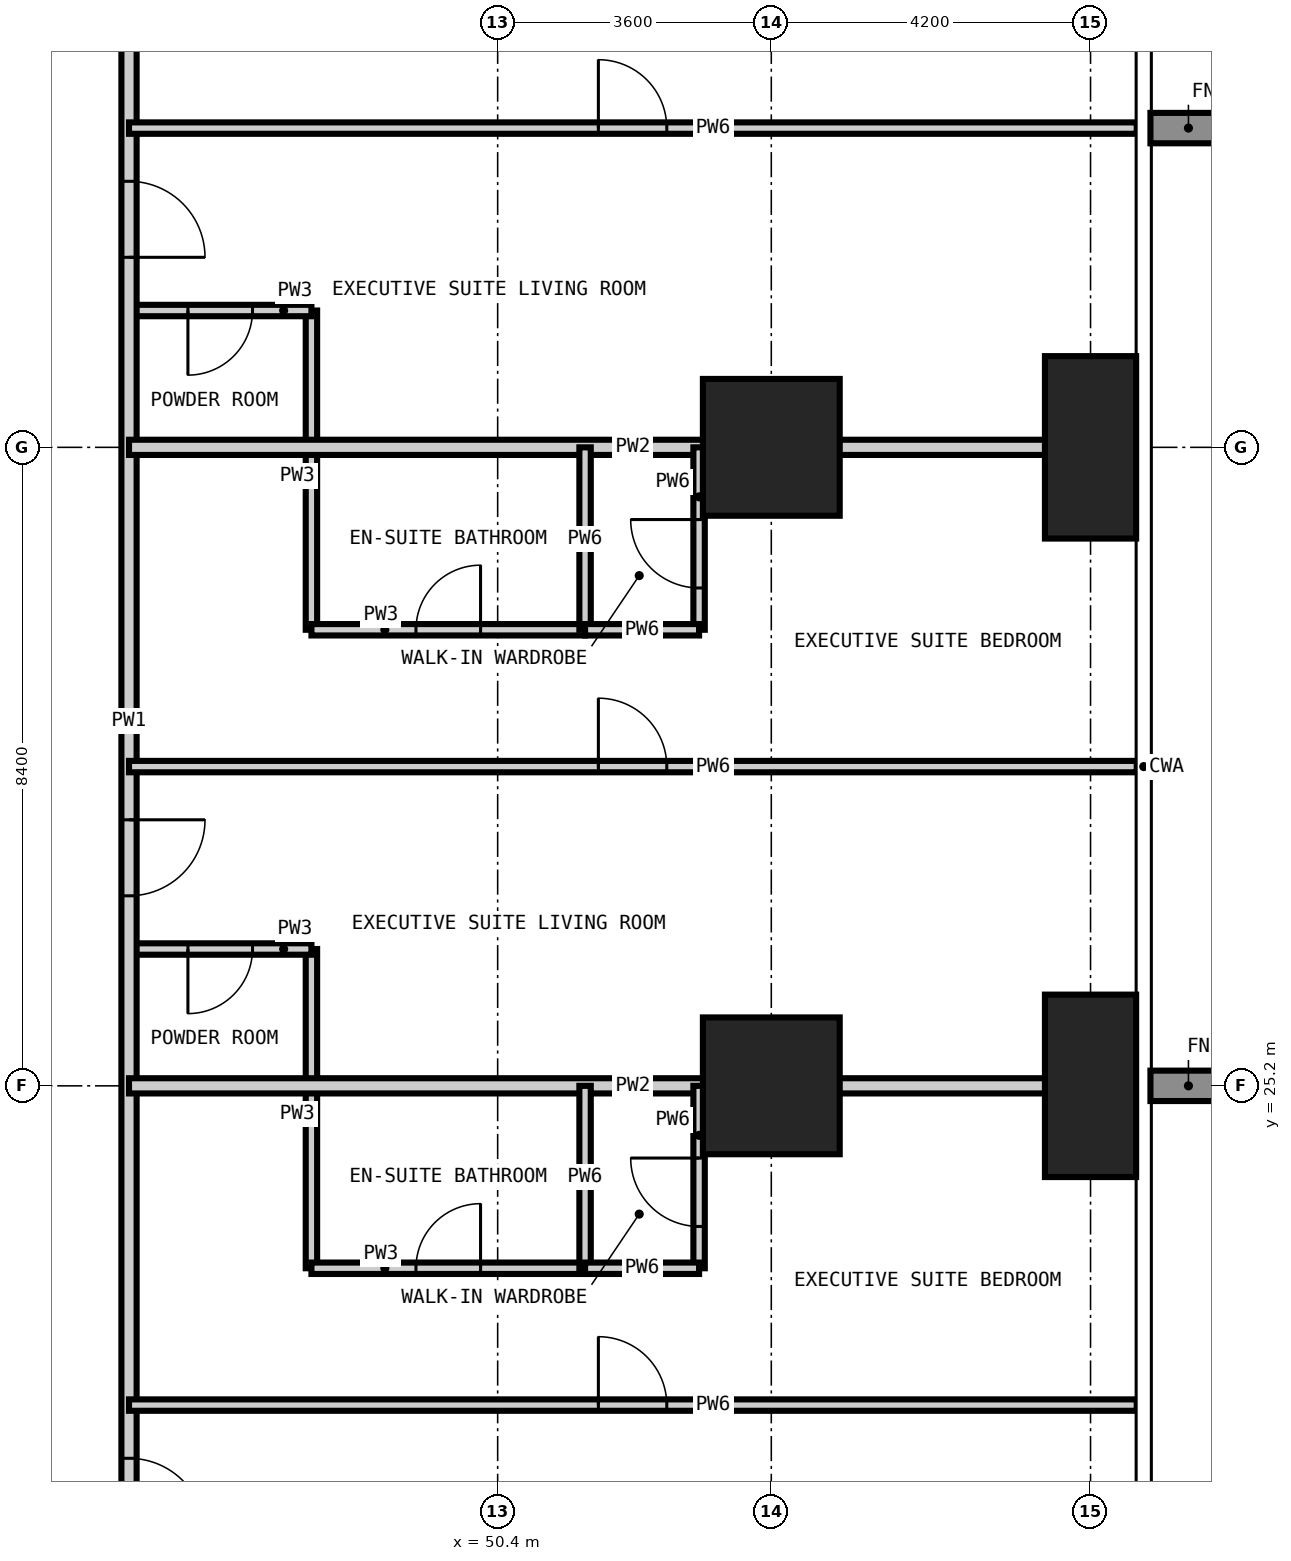
"""IFC4 building model, lengths in metres.
Left out: names, types, materials, properties, quantities, classifications, styles, units other than length and angle.
Written with IfcOpenShell. Run it as: python <this file> out.ifc"""

import sys

from ifc_helpers import new_model, si_unit, direction, frame, frame_2d, origin, origin_2d, place, context, subcontext, project, spatial, rectangle, extrude, element, fill, save


model = new_model("IFC4")
c1 = context("Model", 3, precision=1e-05, world=origin(), true_north=direction((0.0, 1.0)))
c2 = subcontext(c1, "Body", "Model", "MODEL_VIEW")
j1 = project(units=[si_unit("LENGTHUNIT", "METRE"), si_unit("PLANEANGLEUNIT", "RADIAN")], contexts=[c1])
p1 = place(None, origin())
s1 = spatial("IfcSite", under=j1, at=p1, CompositionType="ELEMENT")
p2 = place(p1, origin())
s2 = spatial("IfcBuilding", under=s1, at=p2, CompositionType="ELEMENT")
p3 = place(p2, frame((0.0, 0.0, 55.8)))
s3 = spatial("IfcBuildingStorey", under=s2, at=p3, CompositionType="ELEMENT", Elevation=55.8)
for number, where, z_axis, x_axis in (
    (1, (54.0, 25.2, -0.35), (0.0, 0.0, 1.0), (1.0, 0.0, 0.0)),
    (2, (54.0, 33.6, -0.35), (0.0, 0.0, 1.0), (1.0, 0.0, 0.0)),
):
    element("IfcColumn", number, at=place(p3, frame(where, z_axis=z_axis, x_axis=x_axis)), inside=s3, PredefinedType="COLUMN", context=c2, shape_type="SweptSolid", body=[
        extrude(rectangle(XDim=1.8, YDim=1.8, at=origin_2d()), origin(), (0.0, 0.0, 1.0), 3.6),
    ])
for number, where, z_axis, x_axis in (
    (3, (58.2, 25.2, -0.35), (0.0, 0.0, 1.0), (1.0, 0.0, 0.0)),
    (4, (58.2, 33.6, -0.35), (0.0, 0.0, 1.0), (1.0, 0.0, 0.0)),
):
    element("IfcColumn", number, at=place(p3, frame(where, z_axis=z_axis, x_axis=x_axis)), inside=s3, PredefinedType="COLUMN", context=c2, shape_type="SweptSolid", body=[
        extrude(rectangle(XDim=1.2, YDim=2.4, at=origin_2d()), origin(), (0.0, 0.0, 1.0), 3.6),
    ])
for number, where, z_axis, x_axis in (
    (5, (47.95, 22.8, 0.0), (0.0, 0.0, 1.0), (0.0, 1.0, 0.0)),
    (6, (47.95, 31.2, 0.0), (0.0, 0.0, 1.0), (0.0, 1.0, 0.0)),
):
    element("IfcWall", number, at=place(p3, frame(where, z_axis=z_axis, x_axis=x_axis)), inside=s3, PredefinedType="PARTITIONING", context=c2, shape_type="SweptSolid", body=[
        extrude(rectangle(XDim=4.2, YDim=0.15, at=frame_2d((2.1, 0.0))), origin(), (0.0, 0.0, 1.0), 3.25),
    ])
p4 = place(p3, frame((47.95, 22.8, 0.0), z_axis=(0.0, 0.0, 1.0), x_axis=(1.0, 0.0, 0.0)))
e7 = element("IfcWall", 7, at=p4, inside=s3, PredefinedType="PARTITIONING", context=c2, shape_type="SweptSolid", body=[
    extrude(rectangle(XDim=3.6, YDim=0.15, at=frame_2d((1.8, 0.0))), origin(), (0.0, 0.0, 1.0), 3.25),
])
p5 = place(p4, frame((1.375, 0.0, 0.0)))
e8 = element("IfcOpeningElement", 8, at=p5, cuts=e7, PredefinedType="OPENING", context=c2, shape_type="SweptSolid", body=[
    extrude(rectangle(XDim=0.85, YDim=2.1, at=frame_2d((0.425, 1.05))), frame((0.0, 0.085, 0.0), z_axis=(0.0, -1.0, 0.0), x_axis=(1.0, 0.0, 0.0)), (0.0, 0.0, 1.0), 0.17),
])
p6 = place(p3, frame((45.55, 27.0, 0.0), z_axis=(0.0, 0.0, 1.0), x_axis=(1.0, 0.0, 0.0)))
e9 = element("IfcWall", 9, at=p6, inside=s3, PredefinedType="PARTITIONING", context=c2, shape_type="SweptSolid", body=[
    extrude(rectangle(XDim=2.4, YDim=0.15, at=frame_2d((1.2, 0.0))), origin(), (0.0, 0.0, 1.0), 3.25),
])
p7 = place(p6, frame((0.775, 0.0, 0.0)))
e10 = element("IfcOpeningElement", 10, at=p7, cuts=e9, PredefinedType="OPENING", context=c2, shape_type="SweptSolid", body=[
    extrude(rectangle(XDim=0.85, YDim=2.1, at=frame_2d((0.425, 1.05))), frame((0.0, 0.085, 0.0), z_axis=(0.0, -1.0, 0.0), x_axis=(1.0, 0.0, 0.0)), (0.0, 0.0, 1.0), 0.17),
])
p8 = place(p3, frame((47.95, 31.2, 0.0), z_axis=(0.0, 0.0, 1.0), x_axis=(1.0, 0.0, 0.0)))
e11 = element("IfcWall", 11, at=p8, inside=s3, PredefinedType="PARTITIONING", context=c2, shape_type="SweptSolid", body=[
    extrude(rectangle(XDim=3.6, YDim=0.15, at=frame_2d((1.8, 0.0))), origin(), (0.0, 0.0, 1.0), 3.25),
])
p9 = place(p8, frame((1.375, 0.0, 0.0)))
e12 = element("IfcOpeningElement", 12, at=p9, cuts=e11, PredefinedType="OPENING", context=c2, shape_type="SweptSolid", body=[
    extrude(rectangle(XDim=0.85, YDim=2.1, at=frame_2d((0.425, 1.05))), frame((0.0, 0.085, 0.0), z_axis=(0.0, -1.0, 0.0), x_axis=(1.0, 0.0, 0.0)), (0.0, 0.0, 1.0), 0.17),
])
p10 = place(p3, frame((45.55, 35.4, 0.0), z_axis=(0.0, 0.0, 1.0), x_axis=(1.0, 0.0, 0.0)))
e13 = element("IfcWall", 13, at=p10, inside=s3, PredefinedType="PARTITIONING", context=c2, shape_type="SweptSolid", body=[
    extrude(rectangle(XDim=2.4, YDim=0.15, at=frame_2d((1.2, 0.0))), origin(), (0.0, 0.0, 1.0), 3.25),
])
p11 = place(p10, frame((0.775, 0.0, 0.0)))
e14 = element("IfcOpeningElement", 14, at=p11, cuts=e13, PredefinedType="OPENING", context=c2, shape_type="SweptSolid", body=[
    extrude(rectangle(XDim=0.85, YDim=2.1, at=frame_2d((0.425, 1.05))), frame((0.0, 0.085, 0.0), z_axis=(0.0, -1.0, 0.0), x_axis=(1.0, 0.0, 0.0)), (0.0, 0.0, 1.0), 0.17),
])
p12 = place(p3, frame((45.55, 46.15, 0.0), z_axis=(0.0, 0.0, 1.0), x_axis=(0.0, -1.0, 0.0)))
e15 = element("IfcWall", 15, at=p12, inside=s3, PredefinedType="PARTITIONING", context=c2, shape_type="SweptSolid", body=[
    extrude(rectangle(XDim=32.3, YDim=0.2, at=frame_2d((16.15, 0.0))), origin(), (0.0, 0.0, 1.0), 3.25),
])
p13 = place(p12, frame((25.85, 0.0, 0.0)))
e16 = element("IfcOpeningElement", 16, at=p13, cuts=e15, PredefinedType="OPENING", context=c2, shape_type="SweptSolid", body=[
    extrude(rectangle(XDim=1.0, YDim=2.2, at=frame_2d((0.5, 1.1))), frame((0.0, 0.11, 0.0), z_axis=(0.0, -1.0, 0.0), x_axis=(1.0, 0.0, 0.0)), (0.0, 0.0, 1.0), 0.22),
])
p14 = place(p12, frame((17.45, 0.0, 0.0)))
e17 = element("IfcOpeningElement", 17, at=p14, cuts=e15, PredefinedType="OPENING", context=c2, shape_type="SweptSolid", body=[
    extrude(rectangle(XDim=1.0, YDim=2.2, at=frame_2d((0.5, 1.1))), frame((0.0, 0.11, 0.0), z_axis=(0.0, -1.0, 0.0), x_axis=(1.0, 0.0, 0.0)), (0.0, 0.0, 1.0), 0.22),
])
p15 = place(p12, frame((9.05, 0.0, 0.0)))
e18 = element("IfcOpeningElement", 18, at=p15, cuts=e15, PredefinedType="OPENING", context=c2, shape_type="SweptSolid", body=[
    extrude(rectangle(XDim=1.0, YDim=2.2, at=frame_2d((0.5, 1.1))), frame((0.0, 0.11, 0.0), z_axis=(0.0, -1.0, 0.0), x_axis=(1.0, 0.0, 0.0)), (0.0, 0.0, 1.0), 0.22),
])
p16 = place(p12, frame((30.325, 0.0, 0.0)))
e19 = element("IfcOpeningElement", 19, at=p16, cuts=e15, PredefinedType="OPENING", context=c2, shape_type="SweptSolid", body=[
    extrude(rectangle(XDim=1.0, YDim=2.2, at=frame_2d((0.5, 1.1))), frame((0.0, 0.11, 0.0), z_axis=(0.0, -1.0, 0.0), x_axis=(1.0, 0.0, 0.0)), (0.0, 0.0, 1.0), 0.22),
])
p17 = place(p12, frame((1.575, 0.0, 0.0)))
e20 = element("IfcOpeningElement", 20, at=p17, cuts=e15, PredefinedType="OPENING", context=c2, shape_type="SweptSolid", body=[
    extrude(rectangle(XDim=1.0, YDim=2.2, at=frame_2d((0.5, 1.1))), frame((0.0, 0.11, 0.0), z_axis=(0.0, -1.0, 0.0), x_axis=(1.0, 0.0, 0.0)), (0.0, 0.0, 1.0), 0.22),
])
for number, where, z_axis, x_axis in (
    (21, (45.55, 25.2, 0.0), (0.0, 0.0, 1.0), (1.0, 0.0, 0.0)),
    (22, (45.55, 33.6, 0.0), (0.0, 0.0, 1.0), (1.0, 0.0, 0.0)),
):
    element("IfcWall", number, at=place(p3, frame(where, z_axis=z_axis, x_axis=x_axis)), inside=s3, PredefinedType="PARTITIONING", context=c2, shape_type="SweptSolid", body=[
        extrude(rectangle(XDim=13.258, YDim=0.2, at=frame_2d((6.629, 0.0))), origin(), (0.0, 0.0, 1.0), 3.25),
    ])
p18 = place(p3, frame((51.55, 22.8, 0.0), z_axis=(0.0, 0.0, 1.0), x_axis=(0.0, 1.0, 0.0)))
e23 = element("IfcWall", 23, at=p18, inside=s3, PredefinedType="PARTITIONING", context=c2, shape_type="SweptSolid", body=[
    extrude(rectangle(XDim=2.4, YDim=0.15, at=frame_2d((1.2, 0.0))), origin(), (0.0, 0.0, 1.0), 3.25),
])
p19 = place(p3, frame((51.55, 31.2, 0.0), z_axis=(0.0, 0.0, 1.0), x_axis=(0.0, 1.0, 0.0)))
e24 = element("IfcWall", 24, at=p19, inside=s3, PredefinedType="PARTITIONING", context=c2, shape_type="SweptSolid", body=[
    extrude(rectangle(XDim=2.4, YDim=0.15, at=frame_2d((1.2, 0.0))), origin(), (0.0, 0.0, 1.0), 3.25),
])
p20 = place(p3, frame((53.05, 22.8, 0.0), z_axis=(0.0, 0.0, 1.0), x_axis=(0.0, 1.0, 0.0)))
e25 = element("IfcWall", 25, at=p20, inside=s3, PredefinedType="PARTITIONING", context=c2, shape_type="SweptSolid", body=[
    extrude(rectangle(XDim=2.4, YDim=0.15, at=frame_2d((1.2, 0.0))), origin(), (0.0, 0.0, 1.0), 3.25),
])
p21 = place(p20, frame((0.55, 0.0, 0.0)))
e26 = element("IfcOpeningElement", 26, at=p21, cuts=e25, PredefinedType="OPENING", context=c2, shape_type="SweptSolid", body=[
    extrude(rectangle(XDim=0.9, YDim=2.1, at=frame_2d((0.45, 1.05))), frame((0.0, 0.085, 0.0), z_axis=(0.0, -1.0, 0.0), x_axis=(1.0, 0.0, 0.0)), (0.0, 0.0, 1.0), 0.17),
])
p22 = place(p3, frame((53.05, 31.2, 0.0), z_axis=(0.0, 0.0, 1.0), x_axis=(0.0, 1.0, 0.0)))
e27 = element("IfcWall", 27, at=p22, inside=s3, PredefinedType="PARTITIONING", context=c2, shape_type="SweptSolid", body=[
    extrude(rectangle(XDim=2.4, YDim=0.15, at=frame_2d((1.2, 0.0))), origin(), (0.0, 0.0, 1.0), 3.25),
])
p23 = place(p22, frame((0.55, 0.0, 0.0)))
e28 = element("IfcOpeningElement", 28, at=p23, cuts=e27, PredefinedType="OPENING", context=c2, shape_type="SweptSolid", body=[
    extrude(rectangle(XDim=0.9, YDim=2.1, at=frame_2d((0.45, 1.05))), frame((0.0, 0.085, 0.0), z_axis=(0.0, -1.0, 0.0), x_axis=(1.0, 0.0, 0.0)), (0.0, 0.0, 1.0), 0.17),
])
p24 = place(p3, frame((45.55, 21.0, 0.0), z_axis=(0.0, 0.0, 1.0), x_axis=(1.0, 0.0, 0.0)))
e29 = element("IfcWall", 29, at=p24, inside=s3, PredefinedType="PARTITIONING", context=c2, shape_type="SweptSolid", body=[
    extrude(rectangle(XDim=13.258, YDim=0.15, at=frame_2d((6.629, 0.0))), origin(), (0.0, 0.0, 1.0), 3.25),
])
p25 = place(p24, frame((6.175, 0.0, 0.0)))
e30 = element("IfcOpeningElement", 30, at=p25, cuts=e29, PredefinedType="OPENING", context=c2, shape_type="SweptSolid", body=[
    extrude(rectangle(XDim=0.9, YDim=2.1, at=frame_2d((0.45, 1.05))), frame((0.0, 0.085, 0.0), z_axis=(0.0, -1.0, 0.0), x_axis=(1.0, 0.0, 0.0)), (0.0, 0.0, 1.0), 0.17),
])
p26 = place(p3, frame((51.55, 22.8, 0.0), z_axis=(0.0, 0.0, 1.0), x_axis=(1.0, 0.0, 0.0)))
e31 = element("IfcWall", 31, at=p26, inside=s3, PredefinedType="PARTITIONING", context=c2, shape_type="SweptSolid", body=[
    extrude(rectangle(XDim=1.5, YDim=0.15, at=frame_2d((0.75, 0.0))), origin(), (0.0, 0.0, 1.0), 3.25),
])
p27 = place(p3, frame((45.55, 29.4, 0.0), z_axis=(0.0, 0.0, 1.0), x_axis=(1.0, 0.0, 0.0)))
e32 = element("IfcWall", 32, at=p27, inside=s3, PredefinedType="PARTITIONING", context=c2, shape_type="SweptSolid", body=[
    extrude(rectangle(XDim=13.258, YDim=0.15, at=frame_2d((6.629, 0.0))), origin(), (0.0, 0.0, 1.0), 3.25),
])
p28 = place(p27, frame((6.175, 0.0, 0.0)))
e33 = element("IfcOpeningElement", 33, at=p28, cuts=e32, PredefinedType="OPENING", context=c2, shape_type="SweptSolid", body=[
    extrude(rectangle(XDim=0.9, YDim=2.1, at=frame_2d((0.45, 1.05))), frame((0.0, 0.085, 0.0), z_axis=(0.0, -1.0, 0.0), x_axis=(1.0, 0.0, 0.0)), (0.0, 0.0, 1.0), 0.17),
])
p29 = place(p3, frame((51.55, 31.2, 0.0), z_axis=(0.0, 0.0, 1.0), x_axis=(1.0, 0.0, 0.0)))
e34 = element("IfcWall", 34, at=p29, inside=s3, PredefinedType="PARTITIONING", context=c2, shape_type="SweptSolid", body=[
    extrude(rectangle(XDim=1.5, YDim=0.15, at=frame_2d((0.75, 0.0))), origin(), (0.0, 0.0, 1.0), 3.25),
])
p30 = place(p3, frame((45.55, 37.8, 0.0), z_axis=(0.0, 0.0, 1.0), x_axis=(1.0, 0.0, 0.0)))
e35 = element("IfcWall", 35, at=p30, inside=s3, PredefinedType="PARTITIONING", context=c2, shape_type="SweptSolid", body=[
    extrude(rectangle(XDim=13.258, YDim=0.15, at=frame_2d((6.629, 0.0))), origin(), (0.0, 0.0, 1.0), 3.25),
])
p31 = place(p30, frame((6.175, 0.0, 0.0)))
e36 = element("IfcOpeningElement", 36, at=p31, cuts=e35, PredefinedType="OPENING", context=c2, shape_type="SweptSolid", body=[
    extrude(rectangle(XDim=0.9, YDim=2.1, at=frame_2d((0.45, 1.05))), frame((0.0, 0.085, 0.0), z_axis=(0.0, -1.0, 0.0), x_axis=(1.0, 0.0, 0.0)), (0.0, 0.0, 1.0), 0.17),
])
p32 = place(p13, origin())
e37 = element("IfcDoor", 37, at=p32, inside=s3, OperationType="SINGLE_SWING_RIGHT", PredefinedType="DOOR", context=c2, shape_type="SweptSolid", body=[
    extrude(rectangle(XDim=1.0, YDim=2.2, at=frame_2d((0.5, 1.1))), frame((0.0, 0.025, 0.0), z_axis=(0.0, -1.0, 0.0), x_axis=(1.0, 0.0, 0.0)), (0.0, 0.0, 1.0), 0.05),
])
fill(e16, e37)
p33 = place(p25, origin())
e38 = element("IfcDoor", 38, at=p33, inside=s3, OperationType="SINGLE_SWING_LEFT", PredefinedType="DOOR", context=c2, shape_type="SweptSolid", body=[
    extrude(rectangle(XDim=0.9, YDim=2.1, at=frame_2d((0.45, 1.05))), frame((0.0, 0.025, 0.0), z_axis=(0.0, -1.0, 0.0), x_axis=(1.0, 0.0, 0.0)), (0.0, 0.0, 1.0), 0.05),
])
fill(e30, e38)
p34 = place(p5, origin())
e39 = element("IfcDoor", 39, at=p34, inside=s3, OperationType="SINGLE_SWING_RIGHT", PredefinedType="DOOR", context=c2, shape_type="SweptSolid", body=[
    extrude(rectangle(XDim=0.85, YDim=2.1, at=frame_2d((0.425, 1.05))), frame((0.0, 0.025, 0.0), z_axis=(0.0, -1.0, 0.0), x_axis=(1.0, 0.0, 0.0)), (0.0, 0.0, 1.0), 0.05),
])
fill(e8, e39)
p35 = place(p21, origin())
e40 = element("IfcDoor", 40, at=p35, inside=s3, OperationType="SINGLE_SWING_RIGHT", PredefinedType="DOOR", context=c2, shape_type="SweptSolid", body=[
    extrude(rectangle(XDim=0.9, YDim=2.1, at=frame_2d((0.45, 1.05))), frame((0.0, 0.025, 0.0), z_axis=(0.0, -1.0, 0.0), x_axis=(1.0, 0.0, 0.0)), (0.0, 0.0, 1.0), 0.05),
])
fill(e26, e40)
p36 = place(p14, origin())
e41 = element("IfcDoor", 41, at=p36, inside=s3, OperationType="SINGLE_SWING_LEFT", PredefinedType="DOOR", context=c2, shape_type="SweptSolid", body=[
    extrude(rectangle(XDim=1.0, YDim=2.2, at=frame_2d((0.5, 1.1))), frame((0.0, 0.025, 0.0), z_axis=(0.0, -1.0, 0.0), x_axis=(1.0, 0.0, 0.0)), (0.0, 0.0, 1.0), 0.05),
])
fill(e17, e41)
p37 = place(p7, frame((0.85, 0.0, 0.0), z_axis=(0.0, 0.0, 1.0), x_axis=(-1.0, 0.0, 0.0)))
e42 = element("IfcDoor", 42, at=p37, inside=s3, OperationType="SINGLE_SWING_RIGHT", PredefinedType="DOOR", context=c2, shape_type="SweptSolid", body=[
    extrude(rectangle(XDim=0.85, YDim=2.1, at=frame_2d((0.425, 1.05))), frame((0.0, 0.025, 0.0), z_axis=(0.0, -1.0, 0.0), x_axis=(1.0, 0.0, 0.0)), (0.0, 0.0, 1.0), 0.05),
])
fill(e10, e42)
p38 = place(p28, origin())
e43 = element("IfcDoor", 43, at=p38, inside=s3, OperationType="SINGLE_SWING_LEFT", PredefinedType="DOOR", context=c2, shape_type="SweptSolid", body=[
    extrude(rectangle(XDim=0.9, YDim=2.1, at=frame_2d((0.45, 1.05))), frame((0.0, 0.025, 0.0), z_axis=(0.0, -1.0, 0.0), x_axis=(1.0, 0.0, 0.0)), (0.0, 0.0, 1.0), 0.05),
])
fill(e33, e43)
p39 = place(p9, origin())
e44 = element("IfcDoor", 44, at=p39, inside=s3, OperationType="SINGLE_SWING_RIGHT", PredefinedType="DOOR", context=c2, shape_type="SweptSolid", body=[
    extrude(rectangle(XDim=0.85, YDim=2.1, at=frame_2d((0.425, 1.05))), frame((0.0, 0.025, 0.0), z_axis=(0.0, -1.0, 0.0), x_axis=(1.0, 0.0, 0.0)), (0.0, 0.0, 1.0), 0.05),
])
fill(e12, e44)
p40 = place(p23, origin())
e45 = element("IfcDoor", 45, at=p40, inside=s3, OperationType="SINGLE_SWING_RIGHT", PredefinedType="DOOR", context=c2, shape_type="SweptSolid", body=[
    extrude(rectangle(XDim=0.9, YDim=2.1, at=frame_2d((0.45, 1.05))), frame((0.0, 0.025, 0.0), z_axis=(0.0, -1.0, 0.0), x_axis=(1.0, 0.0, 0.0)), (0.0, 0.0, 1.0), 0.05),
])
fill(e28, e45)
p41 = place(p15, origin())
e46 = element("IfcDoor", 46, at=p41, inside=s3, OperationType="SINGLE_SWING_RIGHT", PredefinedType="DOOR", context=c2, shape_type="SweptSolid", body=[
    extrude(rectangle(XDim=1.0, YDim=2.2, at=frame_2d((0.5, 1.1))), frame((0.0, 0.025, 0.0), z_axis=(0.0, -1.0, 0.0), x_axis=(1.0, 0.0, 0.0)), (0.0, 0.0, 1.0), 0.05),
])
fill(e18, e46)
p42 = place(p11, frame((0.85, 0.0, 0.0), z_axis=(0.0, 0.0, 1.0), x_axis=(-1.0, 0.0, 0.0)))
e47 = element("IfcDoor", 47, at=p42, inside=s3, OperationType="SINGLE_SWING_RIGHT", PredefinedType="DOOR", context=c2, shape_type="SweptSolid", body=[
    extrude(rectangle(XDim=0.85, YDim=2.1, at=frame_2d((0.425, 1.05))), frame((0.0, 0.025, 0.0), z_axis=(0.0, -1.0, 0.0), x_axis=(1.0, 0.0, 0.0)), (0.0, 0.0, 1.0), 0.05),
])
fill(e14, e47)
p43 = place(p31, origin())
e48 = element("IfcDoor", 48, at=p43, inside=s3, OperationType="SINGLE_SWING_LEFT", PredefinedType="DOOR", context=c2, shape_type="SweptSolid", body=[
    extrude(rectangle(XDim=0.9, YDim=2.1, at=frame_2d((0.45, 1.05))), frame((0.0, 0.025, 0.0), z_axis=(0.0, -1.0, 0.0), x_axis=(1.0, 0.0, 0.0)), (0.0, 0.0, 1.0), 0.05),
])
fill(e36, e48)
save(model, sys.argv[1])
